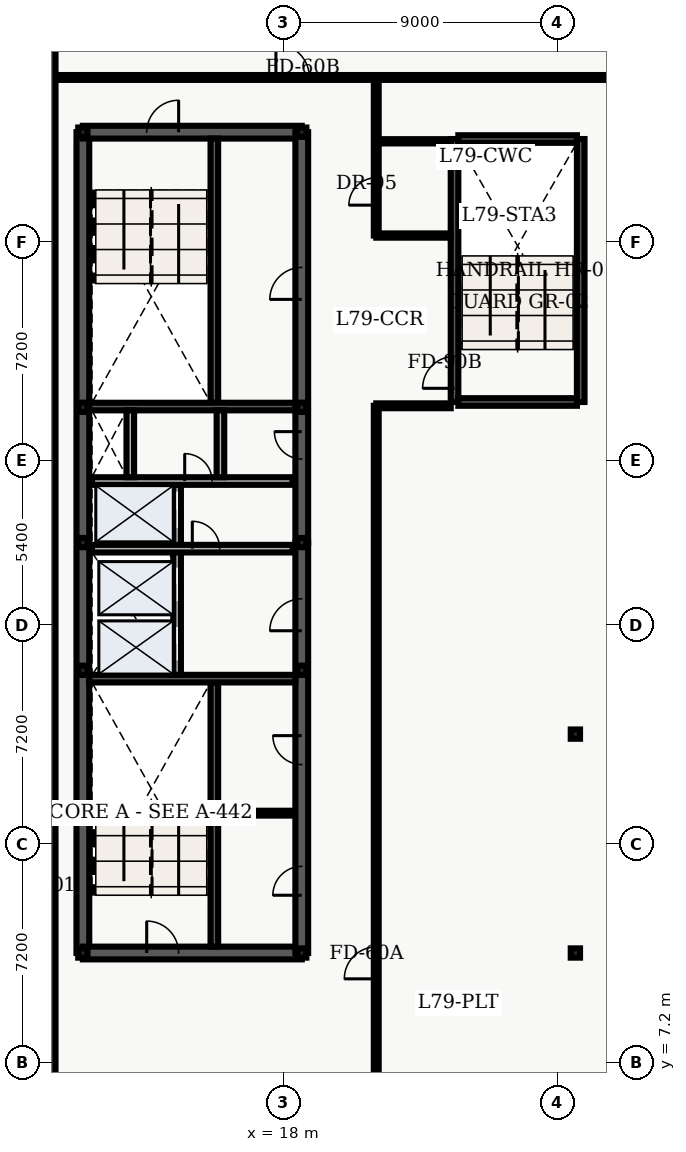
"""IFC4 building model, lengths in metres.
Left out: names, types, materials, properties, quantities, classifications, styles, units other than length and angle.
Written with IfcOpenShell. Run it as: python <this file> out.ifc"""

import sys

from ifc_helpers import new_model, entity, si_unit, converted_unit, direction, frame, origin_with_axes, origin_2d_with_axis, place, context, subcontext, project, spatial, polyline, rectangle, hollow_rectangle, outline, extrude, element, fill, save


model = new_model("IFC4")
c1 = context("Model", 3, precision=1e-05, world=origin_with_axes(), true_north=direction((0.0, 1.0)))
c2 = subcontext(c1, "Body", "Model", "MODEL_VIEW")
j1 = project(units=[si_unit("LENGTHUNIT", "METRE"), converted_unit("PLANEANGLEUNIT", "DEGREE", entity("IfcPlaneAngleMeasure", 0.017), si_unit("PLANEANGLEUNIT", "RADIAN"), dimensions=[0, 0, 0, 0, 0, 0, 0])], contexts=[c1])
p1 = place(None, origin_with_axes())
s1 = spatial("IfcSite", under=j1, at=p1, CompositionType="ELEMENT")
p2 = place(p1, origin_with_axes())
s2 = spatial("IfcBuilding", under=s1, at=p2, CompositionType="ELEMENT")
p3 = place(p2, frame((0.0, 0.0, 320.4), z_axis=(0.0, 0.0, 1.0), x_axis=(1.0, 0.0, 0.0)))
s3 = spatial("IfcBuildingStorey", under=s2, at=p3, CompositionType="ELEMENT", Elevation=320.4)
p4 = place(p3, frame((11.4, 10.8, 0.0), z_axis=(0.0, 0.0, 1.0), x_axis=(0.0, 1.0, 0.0)))
e1 = element("IfcWall", 1, at=p4, inside=s3, PredefinedType="SHEAR", context=c2, shape_type="SweptSolid", body=[
    extrude(outline(polyline([(0.0, -0.21), (27.0, -0.21), (27.0, 0.21), (0.0, 0.21), (0.0, -0.21)])), origin_with_axes(), (0.0, 0.0, 1.0), 3.64),
])
p5 = place(p3, frame((11.4, 10.8, 0.0), z_axis=(0.0, 0.0, 1.0), x_axis=(1.0, 0.0, 0.0)))
e2 = element("IfcWall", 2, at=p5, inside=s3, PredefinedType="SHEAR", context=c2, shape_type="SweptSolid", body=[
    extrude(outline(polyline([(0.0, -0.21), (7.2, -0.21), (7.2, 0.21), (0.0, 0.21), (0.0, -0.21)])), origin_with_axes(), (0.0, 0.0, 1.0), 3.64),
])
p6 = place(p5, frame((2.625, 0.0, 0.0), z_axis=(0.0, 0.0, 1.0), x_axis=(1.0, 0.0, 0.0)))
e3 = element("IfcOpeningElement", 3, at=p6, cuts=e2, PredefinedType="OPENING", context=c2, shape_type="SweptSolid", body=[
    extrude(rectangle(XDim=1.05, YDim=0.44, at=origin_2d_with_axis()), origin_with_axes(), (0.0, 0.0, 1.0), 2.15),
])
p7 = place(p3, frame((11.4, 37.8, 0.0), z_axis=(0.0, 0.0, 1.0), x_axis=(1.0, 0.0, 0.0)))
e4 = element("IfcWall", 4, at=p7, inside=s3, PredefinedType="SHEAR", context=c2, shape_type="SweptSolid", body=[
    extrude(outline(polyline([(0.0, -0.21), (7.2, -0.21), (7.2, 0.21), (0.0, 0.21), (0.0, -0.21)])), origin_with_axes(), (0.0, 0.0, 1.0), 3.64),
])
p8 = place(p7, frame((2.625, 0.0, 0.0), z_axis=(0.0, 0.0, 1.0), x_axis=(1.0, 0.0, 0.0)))
e5 = element("IfcOpeningElement", 5, at=p8, cuts=e4, PredefinedType="OPENING", context=c2, shape_type="SweptSolid", body=[
    extrude(rectangle(XDim=1.05, YDim=0.44, at=origin_2d_with_axis()), origin_with_axes(), (0.0, 0.0, 1.0), 2.15),
])
p9 = place(p3, frame((18.6, 10.8, 0.0), z_axis=(0.0, 0.0, 1.0), x_axis=(0.0, 1.0, 0.0)))
e6 = element("IfcWall", 6, at=p9, inside=s3, PredefinedType="SHEAR", context=c2, shape_type="SweptSolid", body=[
    extrude(outline(polyline([(0.0, -0.21), (13.5, -0.21), (13.5, 0.21), (0.0, 0.21), (0.0, -0.21)])), origin_with_axes(), (0.0, 0.0, 1.0), 3.64),
])
p10 = place(p9, frame((11.125, 0.0, 0.0), z_axis=(0.0, 0.0, 1.0), x_axis=(1.0, 0.0, 0.0)))
e7 = element("IfcOpeningElement", 7, at=p10, cuts=e6, PredefinedType="OPENING", context=c2, shape_type="SweptSolid", body=[
    extrude(rectangle(XDim=1.05, YDim=0.44, at=origin_2d_with_axis()), origin_with_axes(), (0.0, 0.0, 1.0), 2.15),
])
p11 = place(p9, frame((2.375, 0.0, 0.0), z_axis=(0.0, 0.0, 1.0), x_axis=(1.0, 0.0, 0.0)))
e8 = element("IfcOpeningElement", 8, at=p11, cuts=e6, PredefinedType="OPENING", context=c2, shape_type="SweptSolid", body=[
    extrude(rectangle(XDim=0.95, YDim=0.44, at=origin_2d_with_axis()), origin_with_axes(), (0.0, 0.0, 1.0), 2.15),
])
p12 = place(p9, frame((6.675, 0.0, 0.0), z_axis=(0.0, 0.0, 1.0), x_axis=(1.0, 0.0, 0.0)))
e9 = element("IfcOpeningElement", 9, at=p12, cuts=e6, PredefinedType="OPENING", context=c2, shape_type="SweptSolid", body=[
    extrude(rectangle(XDim=0.95, YDim=0.44, at=origin_2d_with_axis()), origin_with_axes(), (0.0, 0.0, 1.0), 2.15),
])
p13 = place(p3, frame((18.6, 24.3, 0.0), z_axis=(0.0, 0.0, 1.0), x_axis=(0.0, 1.0, 0.0)))
e10 = element("IfcWall", 10, at=p13, inside=s3, PredefinedType="SHEAR", context=c2, shape_type="SweptSolid", body=[
    extrude(outline(polyline([(0.0, -0.21), (13.5, -0.21), (13.5, 0.21), (0.0, 0.21), (0.0, -0.21)])), origin_with_axes(), (0.0, 0.0, 1.0), 3.64),
])
p14 = place(p13, frame((3.2, 0.0, 0.0), z_axis=(0.0, 0.0, 1.0), x_axis=(1.0, 0.0, 0.0)))
e11 = element("IfcOpeningElement", 11, at=p14, cuts=e10, PredefinedType="OPENING", context=c2, shape_type="SweptSolid", body=[
    extrude(rectangle(XDim=0.9, YDim=0.44, at=origin_2d_with_axis()), origin_with_axes(), (0.0, 0.0, 1.0), 2.15),
])
p15 = place(p13, frame((8.525, 0.0, 0.0), z_axis=(0.0, 0.0, 1.0), x_axis=(1.0, 0.0, 0.0)))
e12 = element("IfcOpeningElement", 12, at=p15, cuts=e10, PredefinedType="OPENING", context=c2, shape_type="SweptSolid", body=[
    extrude(rectangle(XDim=1.05, YDim=0.44, at=origin_2d_with_axis()), origin_with_axes(), (0.0, 0.0, 1.0), 2.15),
])
p16 = place(p3, frame((15.725, 11.01, 0.0), z_axis=(0.0, 0.0, 1.0), x_axis=(0.0, 1.0, 0.0)))
e13 = element("IfcWall", 13, at=p16, inside=s3, PredefinedType="SHEAR", context=c2, shape_type="SweptSolid", body=[
    extrude(outline(polyline([(0.0, -0.125), (8.69, -0.125), (8.69, 0.125), (0.0, 0.125), (0.0, -0.125)])), origin_with_axes(), (0.0, 0.0, 1.0), 3.64),
])
p17 = place(p3, frame((11.61, 19.825, 0.0), z_axis=(0.0, 0.0, 1.0), x_axis=(1.0, 0.0, 0.0)))
e14 = element("IfcWall", 14, at=p17, inside=s3, PredefinedType="SHEAR", context=c2, shape_type="SweptSolid", body=[
    extrude(outline(polyline([(0.0, -0.125), (6.78, -0.125), (6.78, 0.125), (0.0, 0.125), (0.0, -0.125)])), origin_with_axes(), (0.0, 0.0, 1.0), 3.64),
])
p18 = place(p3, frame((15.725, 28.9, 0.0), z_axis=(0.0, 0.0, 1.0), x_axis=(0.0, 1.0, 0.0)))
e15 = element("IfcWall", 15, at=p18, inside=s3, PredefinedType="SHEAR", context=c2, shape_type="SweptSolid", body=[
    extrude(outline(polyline([(0.0, -0.125), (8.69, -0.125), (8.69, 0.125), (0.0, 0.125), (0.0, -0.125)])), origin_with_axes(), (0.0, 0.0, 1.0), 3.64),
])
p19 = place(p3, frame((11.61, 28.775, 0.0), z_axis=(0.0, 0.0, 1.0), x_axis=(1.0, 0.0, 0.0)))
e16 = element("IfcWall", 16, at=p19, inside=s3, PredefinedType="SHEAR", context=c2, shape_type="SweptSolid", body=[
    extrude(outline(polyline([(0.0, -0.125), (6.78, -0.125), (6.78, 0.125), (0.0, 0.125), (0.0, -0.125)])), origin_with_axes(), (0.0, 0.0, 1.0), 3.64),
])
p20 = place(p3, frame((14.5, 19.95, 0.0), z_axis=(0.0, 0.0, 1.0), x_axis=(0.0, 1.0, 0.0)))
e17 = element("IfcWall", 17, at=p20, inside=s3, PredefinedType="SOLIDWALL", context=c2, shape_type="SweptSolid", body=[
    extrude(outline(polyline([(0.0, -0.125), (6.25, -0.125), (6.25, 0.125), (0.0, 0.125), (0.0, -0.125)])), origin_with_axes(), (0.0, 0.0, 1.0), 2.68),
])
p21 = place(p20, frame((1.025, 0.0, 0.0), z_axis=(0.0, 0.0, 1.0), x_axis=(1.0, 0.0, 0.0)))
e18 = element("IfcOpeningElement", 18, at=p21, cuts=e17, PredefinedType="OPENING", context=c2, shape_type="SweptSolid", body=[
    extrude(rectangle(XDim=1.1, YDim=0.27, at=origin_2d_with_axis()), origin_with_axes(), (0.0, 0.0, 1.0), 2.15),
])
p22 = place(p20, frame((2.975, 0.0, 0.0), z_axis=(0.0, 0.0, 1.0), x_axis=(1.0, 0.0, 0.0)))
e19 = element("IfcOpeningElement", 19, at=p22, cuts=e17, PredefinedType="OPENING", context=c2, shape_type="SweptSolid", body=[
    extrude(rectangle(XDim=1.1, YDim=0.27, at=origin_2d_with_axis()), origin_with_axes(), (0.0, 0.0, 1.0), 2.15),
])
p23 = place(p20, frame((5.425, 0.0, 0.0), z_axis=(0.0, 0.0, 1.0), x_axis=(1.0, 0.0, 0.0)))
e20 = element("IfcOpeningElement", 20, at=p23, cuts=e17, PredefinedType="OPENING", context=c2, shape_type="SweptSolid", body=[
    extrude(rectangle(XDim=1.2, YDim=0.27, at=origin_2d_with_axis()), origin_with_axes(), (0.0, 0.0, 1.0), 2.15),
])
p24 = place(p3, frame((11.7, 24.1, 0.0), z_axis=(0.0, 0.0, 1.0), x_axis=(1.0, 0.0, 0.0)))
e21 = element("IfcWall", 21, at=p24, inside=s3, PredefinedType="SOLIDWALL", context=c2, shape_type="SweptSolid", body=[
    extrude(outline(polyline([(0.0, -0.125), (6.6, -0.125), (6.6, 0.125), (0.0, 0.125), (0.0, -0.125)])), origin_with_axes(), (0.0, 0.0, 1.0), 2.68),
])
p25 = place(p24, frame((3.75, 0.0, 0.0), z_axis=(0.0, 0.0, 1.0), x_axis=(1.0, 0.0, 0.0)))
e22 = element("IfcOpeningElement", 22, at=p25, cuts=e21, PredefinedType="OPENING", context=c2, shape_type="SweptSolid", body=[
    extrude(rectangle(XDim=0.9, YDim=0.27, at=origin_2d_with_axis()), origin_with_axes(), (0.0, 0.0, 1.0), 2.15),
])
p26 = place(p3, frame((11.7, 26.325, 0.0), z_axis=(0.0, 0.0, 1.0), x_axis=(1.0, 0.0, 0.0)))
e23 = element("IfcWall", 23, at=p26, inside=s3, PredefinedType="SOLIDWALL", context=c2, shape_type="SweptSolid", body=[
    extrude(outline(polyline([(0.0, -0.125), (6.6, -0.125), (6.6, 0.125), (0.0, 0.125), (0.0, -0.125)])), origin_with_axes(), (0.0, 0.0, 1.0), 2.68),
])
p27 = place(p26, frame((3.5, 0.0, 0.0), z_axis=(0.0, 0.0, 1.0), x_axis=(1.0, 0.0, 0.0)))
e24 = element("IfcOpeningElement", 24, at=p27, cuts=e23, PredefinedType="OPENING", context=c2, shape_type="SweptSolid", body=[
    extrude(rectangle(XDim=0.9, YDim=0.27, at=origin_2d_with_axis()), origin_with_axes(), (0.0, 0.0, 1.0), 2.15),
])
for number, where, z_axis, x_axis in (
    (25, (12.96, 26.45, 0.0), (0.0, 0.0, 1.0), (0.0, 1.0, 0.0)),
    (26, (15.925, 26.45, 0.0), (0.0, 0.0, 1.0), (0.0, 1.0, 0.0)),
):
    element("IfcWall", number, at=place(p3, frame(where, z_axis=z_axis, x_axis=x_axis)), inside=s3, PredefinedType="SOLIDWALL", context=c2, shape_type="SweptSolid", body=[
        extrude(outline(polyline([(0.0, -0.125), (2.2, -0.125), (2.2, 0.125), (0.0, 0.125), (0.0, -0.125)])), origin_with_axes(), (0.0, 0.0, 1.0), 2.68),
    ])
p28 = place(p3, frame((23.625, 28.925, 0.0), z_axis=(0.0, 0.0, 1.0), x_axis=(0.0, 1.0, 0.0)))
e27 = element("IfcWall", 27, at=p28, inside=s3, PredefinedType="SHEAR", context=c2, shape_type="SweptSolid", body=[
    extrude(outline(polyline([(0.0, -0.125), (8.65, -0.125), (8.65, 0.125), (0.0, 0.125), (0.0, -0.125)])), origin_with_axes(), (0.0, 0.0, 1.0), 3.64),
])
p29 = place(p28, frame((0.975, 0.0, 0.0), z_axis=(0.0, 0.0, 1.0), x_axis=(1.0, 0.0, 0.0)))
e28 = element("IfcOpeningElement", 28, at=p29, cuts=e27, PredefinedType="OPENING", context=c2, shape_type="SweptSolid", body=[
    extrude(rectangle(XDim=1.05, YDim=0.27, at=origin_2d_with_axis()), origin_with_axes(), (0.0, 0.0, 1.0), 2.15),
])
p30 = place(p3, frame((27.775, 28.925, 0.0), z_axis=(0.0, 0.0, 1.0), x_axis=(0.0, 1.0, 0.0)))
e29 = element("IfcWall", 29, at=p30, inside=s3, PredefinedType="SHEAR", context=c2, shape_type="SweptSolid", body=[
    extrude(outline(polyline([(0.0, -0.125), (8.65, -0.125), (8.65, 0.125), (0.0, 0.125), (0.0, -0.125)])), origin_with_axes(), (0.0, 0.0, 1.0), 3.64),
])
for number, where, z_axis, x_axis in (
    (30, (23.75, 28.925, 0.0), (0.0, 0.0, 1.0), (1.0, 0.0, 0.0)),
    (31, (23.75, 37.575, 0.0), (0.0, 0.0, 1.0), (1.0, 0.0, 0.0)),
):
    element("IfcWall", number, at=place(p3, frame(where, z_axis=z_axis, x_axis=x_axis)), inside=s3, PredefinedType="SHEAR", context=c2, shape_type="SweptSolid", body=[
        extrude(outline(polyline([(0.0, -0.125), (3.9, -0.125), (3.9, 0.125), (0.0, 0.125), (0.0, -0.125)])), origin_with_axes(), (0.0, 0.0, 1.0), 3.64),
    ])
for number, where, z_axis, x_axis in (
    (32, (11.4, 10.8, 0.0), (0.0, 0.0, 1.0), (1.0, 0.0, 0.0)),
    (33, (11.4, 20.1, 0.0), (0.0, 0.0, 1.0), (1.0, 0.0, 0.0)),
    (34, (11.4, 24.3, 0.0), (0.0, 0.0, 1.0), (1.0, 0.0, 0.0)),
    (35, (11.4, 28.75, 0.0), (0.0, 0.0, 1.0), (1.0, 0.0, 0.0)),
    (36, (11.4, 37.8, 0.0), (0.0, 0.0, 1.0), (1.0, 0.0, 0.0)),
    (37, (18.6, 10.8, 0.0), (0.0, 0.0, 1.0), (1.0, 0.0, 0.0)),
    (38, (18.6, 20.1, 0.0), (0.0, 0.0, 1.0), (1.0, 0.0, 0.0)),
    (39, (18.6, 24.3, 0.0), (0.0, 0.0, 1.0), (1.0, 0.0, 0.0)),
    (40, (18.6, 28.75, 0.0), (0.0, 0.0, 1.0), (1.0, 0.0, 0.0)),
    (41, (18.6, 37.8, 0.0), (0.0, 0.0, 1.0), (1.0, 0.0, 0.0)),
    (42, (27.6, 10.8, 0.0), (0.0, 0.0, 1.0), (1.0, 0.0, 0.0)),
    (43, (27.6, 18.0, 0.0), (0.0, 0.0, 1.0), (1.0, 0.0, 0.0)),
):
    element("IfcColumn", number, at=place(p3, frame(where, z_axis=z_axis, x_axis=x_axis)), inside=s3, PredefinedType="COLUMN", context=c2, shape_type="SweptSolid", body=[
        extrude(hollow_rectangle(XDim=0.305, YDim=0.305, WallThickness=0.015, InnerFilletRadius=0.015, OuterFilletRadius=0.03, at=origin_2d_with_axis()), origin_with_axes(), (0.0, 0.0, 1.0), 3.9),
    ])
p31 = place(p3, frame((15.84, 15.4, 0.0), z_axis=(0.0, 0.0, 1.0), x_axis=(1.0, 0.0, 0.0)))
e44 = element("IfcWall", 44, at=p31, inside=s3, PredefinedType="PARTITIONING", context=c2, shape_type="SweptSolid", body=[
    extrude(outline(polyline([(0.0, -0.08), (2.46, -0.08), (2.46, 0.08), (0.0, 0.08), (0.0, -0.08)])), origin_with_axes(), (0.0, 0.0, 1.0), 2.68),
])
for number, where, z_axis, x_axis in (
    (45, (21.05, 34.4, 0.0), (0.0, 0.0, 1.0), (1.0, 0.0, 0.0)),
    (46, (21.05, 37.5, 0.0), (0.0, 0.0, 1.0), (1.0, 0.0, 0.0)),
):
    element("IfcWall", number, at=place(p3, frame(where, z_axis=z_axis, x_axis=x_axis)), inside=s3, PredefinedType="PARTITIONING", context=c2, shape_type="SweptSolid", body=[
        extrude(outline(polyline([(0.0, -0.07), (2.45, -0.07), (2.45, 0.07), (0.0, 0.07), (0.0, -0.07)])), origin_with_axes(), (0.0, 0.0, 1.0), 2.68),
    ])
p32 = place(p3, frame((21.05, 5.695, 0.0), z_axis=(0.0, 0.0, 1.0), x_axis=(0.0, 1.0, 0.0)))
e47 = element("IfcWall", 47, at=p32, inside=s3, PredefinedType="PARTITIONING", context=c2, shape_type="SweptSolid", body=[
    extrude(outline(polyline([(0.0, -0.08), (23.105, -0.08), (23.105, 0.08), (0.0, 0.08), (0.0, -0.08)])), origin_with_axes(), (0.0, 0.0, 1.0), 2.68),
])
p33 = place(p32, frame((4.78, 0.0, 0.0), z_axis=(0.0, 0.0, 1.0), x_axis=(1.0, 0.0, 0.0)))
e48 = element("IfcOpeningElement", 48, at=p33, cuts=e47, PredefinedType="OPENING", context=c2, shape_type="SweptSolid", body=[
    extrude(rectangle(XDim=1.05, YDim=0.18, at=origin_2d_with_axis()), origin_with_axes(), (0.0, 0.0, 1.0), 2.15),
])
p34 = place(p3, frame((21.05, 34.4, 0.0), z_axis=(0.0, 0.0, 1.0), x_axis=(0.0, 1.0, 0.0)))
e49 = element("IfcWall", 49, at=p34, inside=s3, PredefinedType="PARTITIONING", context=c2, shape_type="SweptSolid", body=[
    extrude(outline(polyline([(0.0, -0.08), (5.2, -0.08), (5.2, 0.08), (0.0, 0.08), (0.0, -0.08)])), origin_with_axes(), (0.0, 0.0, 1.0), 2.68),
])
p35 = place(p34, frame((1.45, 0.0, 0.0), z_axis=(0.0, 0.0, 1.0), x_axis=(1.0, 0.0, 0.0)))
e50 = element("IfcOpeningElement", 50, at=p35, cuts=e49, PredefinedType="OPENING", context=c2, shape_type="SweptSolid", body=[
    extrude(rectangle(XDim=0.9, YDim=0.18, at=origin_2d_with_axis()), origin_with_axes(), (0.0, 0.0, 1.0), 2.15),
])
p36 = place(p3, frame((21.05, 28.8, 0.0), z_axis=(0.0, 0.0, 1.0), x_axis=(1.0, 0.0, 0.0)))
e51 = element("IfcWall", 51, at=p36, inside=s3, PredefinedType="PARTITIONING", context=c2, shape_type="SweptSolid", body=[
    extrude(outline(polyline([(0.0, -0.08), (2.45, -0.08), (2.45, 0.08), (0.0, 0.08), (0.0, -0.08)])), origin_with_axes(), (0.0, 0.0, 1.0), 2.68),
])
p37 = place(p3, frame((10.495, 39.6, 0.0), z_axis=(0.0, 0.0, 1.0), x_axis=(1.0, 0.0, 0.0)))
e52 = element("IfcWall", 52, at=p37, inside=s3, PredefinedType="PARTITIONING", context=c2, shape_type="SweptSolid", body=[
    extrude(outline(polyline([(0.0, -0.08), (19.81, -0.08), (19.81, 0.08), (0.0, 0.08), (0.0, -0.08)])), origin_with_axes(), (0.0, 0.0, 1.0), 2.68),
])
p38 = place(p37, frame((7.805, 0.0, 0.0), z_axis=(0.0, 0.0, 1.0), x_axis=(1.0, 0.0, 0.0)))
e53 = element("IfcOpeningElement", 53, at=p38, cuts=e52, PredefinedType="OPENING", context=c2, shape_type="SweptSolid", body=[
    extrude(rectangle(XDim=1.1, YDim=0.18, at=origin_2d_with_axis()), origin_with_axes(), (0.0, 0.0, 1.0), 2.15),
])
p39 = place(p3, frame((10.35, 5.7, 0.0), z_axis=(0.0, 0.0, 1.0), x_axis=(0.0, 1.0, 0.0)))
e54 = element("IfcWall", 54, at=p39, inside=s3, PredefinedType="SOLIDWALL", context=c2, shape_type="SweptSolid", body=[
    extrude(outline(polyline([(0.0, -0.15), (37.5, -0.15), (37.5, 0.15), (0.0, 0.15), (0.0, -0.15)])), origin_with_axes(), (0.0, 0.0, 1.0), 3.64),
])
p40 = place(p20, frame((1.025, 0.0, 0.0), z_axis=(0.0, 0.0, 1.0), x_axis=(1.0, 0.0, 0.0)))
e55 = element("IfcDoor", 55, at=p40, inside=s3, OperationType="SLIDING_TO_LEFT", PredefinedType="DOOR", context=c2, shape_type="SweptSolid", body=[
    extrude(rectangle(XDim=1.1, YDim=0.09, at=origin_2d_with_axis()), origin_with_axes(), (0.0, 0.0, 1.0), 2.15),
])
fill(e18, e55)
p41 = place(p20, frame((2.975, 0.0, 0.0), z_axis=(0.0, 0.0, 1.0), x_axis=(1.0, 0.0, 0.0)))
e56 = element("IfcDoor", 56, at=p41, inside=s3, OperationType="SLIDING_TO_RIGHT", PredefinedType="DOOR", context=c2, shape_type="SweptSolid", body=[
    extrude(rectangle(XDim=1.1, YDim=0.09, at=origin_2d_with_axis()), origin_with_axes(), (0.0, 0.0, 1.0), 2.15),
])
fill(e19, e56)
p42 = place(p20, frame((5.425, 0.0, 0.0), z_axis=(0.0, 0.0, 1.0), x_axis=(1.0, 0.0, 0.0)))
e57 = element("IfcDoor", 57, at=p42, inside=s3, OperationType="DOUBLE_DOOR_SLIDING", PredefinedType="DOOR", context=c2, shape_type="SweptSolid", body=[
    extrude(rectangle(XDim=1.2, YDim=0.09, at=origin_2d_with_axis()), origin_with_axes(), (0.0, 0.0, 1.0), 2.15),
])
fill(e20, e57)
p43 = place(p13, frame((3.2, 0.0, 0.0), z_axis=(0.0, 0.0, 1.0), x_axis=(1.0, 0.0, 0.0)))
e58 = element("IfcDoor", 58, at=p43, inside=s3, OperationType="SINGLE_SWING_RIGHT", PredefinedType="DOOR", context=c2, shape_type="SweptSolid", body=[
    extrude(rectangle(XDim=0.9, YDim=0.09, at=origin_2d_with_axis()), origin_with_axes(), (0.0, 0.0, 1.0), 2.15),
])
fill(e11, e58)
p44 = place(p5, frame((2.625, 0.0, 0.0), z_axis=(0.0, 0.0, 1.0), x_axis=(1.0, 0.0, 0.0)))
e59 = element("IfcDoor", 59, at=p44, inside=s3, OperationType="SINGLE_SWING_LEFT", PredefinedType="DOOR", context=c2, shape_type="SweptSolid", body=[
    extrude(rectangle(XDim=1.05, YDim=0.09, at=origin_2d_with_axis()), origin_with_axes(), (0.0, 0.0, 1.0), 2.15),
])
fill(e3, e59)
p45 = place(p7, frame((2.625, 0.0, 0.0), z_axis=(0.0, 0.0, 1.0), x_axis=(1.0, 0.0, 0.0)))
e60 = element("IfcDoor", 60, at=p45, inside=s3, OperationType="SINGLE_SWING_RIGHT", PredefinedType="DOOR", context=c2, shape_type="SweptSolid", body=[
    extrude(rectangle(XDim=1.05, YDim=0.09, at=origin_2d_with_axis()), origin_with_axes(), (0.0, 0.0, 1.0), 2.15),
])
fill(e5, e60)
p46 = place(p9, frame((11.125, 0.0, 0.0), z_axis=(0.0, 0.0, 1.0), x_axis=(1.0, 0.0, 0.0)))
e61 = element("IfcDoor", 61, at=p46, inside=s3, OperationType="SINGLE_SWING_LEFT", PredefinedType="DOOR", context=c2, shape_type="SweptSolid", body=[
    extrude(rectangle(XDim=1.05, YDim=0.09, at=origin_2d_with_axis()), origin_with_axes(), (0.0, 0.0, 1.0), 2.15),
])
fill(e7, e61)
p47 = place(p24, frame((3.75, 0.0, 0.0), z_axis=(0.0, 0.0, 1.0), x_axis=(1.0, 0.0, 0.0)))
e62 = element("IfcDoor", 62, at=p47, inside=s3, OperationType="SINGLE_SWING_LEFT", PredefinedType="DOOR", context=c2, shape_type="SweptSolid", body=[
    extrude(rectangle(XDim=0.9, YDim=0.09, at=origin_2d_with_axis()), origin_with_axes(), (0.0, 0.0, 1.0), 2.15),
])
fill(e22, e62)
p48 = place(p26, frame((3.5, 0.0, 0.0), z_axis=(0.0, 0.0, 1.0), x_axis=(1.0, 0.0, 0.0)))
e63 = element("IfcDoor", 63, at=p48, inside=s3, OperationType="SINGLE_SWING_LEFT", PredefinedType="DOOR", context=c2, shape_type="SweptSolid", body=[
    extrude(rectangle(XDim=0.9, YDim=0.09, at=origin_2d_with_axis()), origin_with_axes(), (0.0, 0.0, 1.0), 2.15),
])
fill(e24, e63)
p49 = place(p9, frame((2.375, 0.0, 0.0), z_axis=(0.0, 0.0, 1.0), x_axis=(1.0, 0.0, 0.0)))
e64 = element("IfcDoor", 64, at=p49, inside=s3, OperationType="SINGLE_SWING_LEFT", PredefinedType="DOOR", context=c2, shape_type="SweptSolid", body=[
    extrude(rectangle(XDim=0.95, YDim=0.09, at=origin_2d_with_axis()), origin_with_axes(), (0.0, 0.0, 1.0), 2.15),
])
fill(e8, e64)
p50 = place(p9, frame((6.675, 0.0, 0.0), z_axis=(0.0, 0.0, 1.0), x_axis=(1.0, 0.0, 0.0)))
e65 = element("IfcDoor", 65, at=p50, inside=s3, OperationType="SINGLE_SWING_RIGHT", PredefinedType="DOOR", context=c2, shape_type="SweptSolid", body=[
    extrude(rectangle(XDim=0.95, YDim=0.09, at=origin_2d_with_axis()), origin_with_axes(), (0.0, 0.0, 1.0), 2.15),
])
fill(e9, e65)
p51 = place(p13, frame((8.525, 0.0, 0.0), z_axis=(0.0, 0.0, 1.0), x_axis=(1.0, 0.0, 0.0)))
e66 = element("IfcDoor", 66, at=p51, inside=s3, OperationType="SINGLE_SWING_LEFT", PredefinedType="DOOR", context=c2, shape_type="SweptSolid", body=[
    extrude(rectangle(XDim=1.05, YDim=0.09, at=origin_2d_with_axis()), origin_with_axes(), (0.0, 0.0, 1.0), 2.15),
])
fill(e12, e66)
p52 = place(p28, frame((0.975, 0.0, 0.0), z_axis=(0.0, 0.0, 1.0), x_axis=(1.0, 0.0, 0.0)))
e67 = element("IfcDoor", 67, at=p52, inside=s3, OperationType="SINGLE_SWING_LEFT", PredefinedType="DOOR", context=c2, shape_type="SweptSolid", body=[
    extrude(rectangle(XDim=1.05, YDim=0.09, at=origin_2d_with_axis()), origin_with_axes(), (0.0, 0.0, 1.0), 2.15),
])
fill(e28, e67)
p53 = place(p34, frame((1.45, 0.0, 0.0), z_axis=(0.0, 0.0, 1.0), x_axis=(1.0, 0.0, 0.0)))
e68 = element("IfcDoor", 68, at=p53, inside=s3, OperationType="SINGLE_SWING_LEFT", PredefinedType="DOOR", context=c2, shape_type="SweptSolid", body=[
    extrude(rectangle(XDim=0.9, YDim=0.09, at=origin_2d_with_axis()), origin_with_axes(), (0.0, 0.0, 1.0), 2.15),
])
fill(e50, e68)
p54 = place(p32, frame((4.78, 0.0, 0.0), z_axis=(0.0, 0.0, 1.0), x_axis=(1.0, 0.0, 0.0)))
e69 = element("IfcDoor", 69, at=p54, inside=s3, OperationType="SINGLE_SWING_LEFT", PredefinedType="DOOR", context=c2, shape_type="SweptSolid", body=[
    extrude(rectangle(XDim=1.05, YDim=0.09, at=origin_2d_with_axis()), origin_with_axes(), (0.0, 0.0, 1.0), 2.15),
])
fill(e48, e69)
p55 = place(p37, frame((7.805, 0.0, 0.0), z_axis=(0.0, 0.0, 1.0), x_axis=(1.0, 0.0, 0.0)))
e70 = element("IfcDoor", 70, at=p55, inside=s3, OperationType="SINGLE_SWING_LEFT", PredefinedType="DOOR", context=c2, shape_type="SweptSolid", body=[
    extrude(rectangle(XDim=1.1, YDim=0.09, at=origin_2d_with_axis()), origin_with_axes(), (0.0, 0.0, 1.0), 2.15),
])
fill(e53, e70)
save(model, sys.argv[1])
